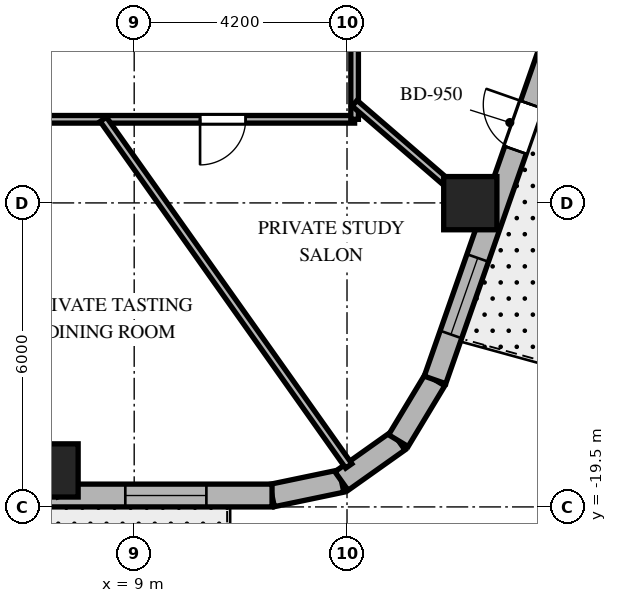
"""IFC4 building model, lengths in metres.
Left out: names, types, materials, properties, quantities, classifications, styles, units other than length and angle.
Written with IfcOpenShell. Run it as: python <this file> out.ifc"""

import sys

from ifc_helpers import new_model, si_unit, direction, frame, frame_2d, origin, origin_2d, place, context, subcontext, project, spatial, rectangle, extrude, element, fill, save


model = new_model("IFC4")
c1 = context("Model", 3, precision=1e-05, world=origin(), true_north=direction((0.0, 1.0)))
c2 = subcontext(c1, "Body", "Model", "MODEL_VIEW")
j1 = project(units=[si_unit("LENGTHUNIT", "METRE"), si_unit("PLANEANGLEUNIT", "RADIAN")], contexts=[c1])
p1 = place(None, origin())
s1 = spatial("IfcSite", under=j1, at=p1, CompositionType="ELEMENT")
p2 = place(p1, origin())
s2 = spatial("IfcBuilding", under=s1, at=p2, CompositionType="ELEMENT")
p3 = place(p2, frame((0.0, 0.0, 166.5)))
s3 = spatial("IfcBuildingStorey", under=s2, at=p3, CompositionType="ELEMENT", Elevation=166.5)
for number, where, z_axis, x_axis in (
    (1, (7.369, -18.78, 0.0), (0.0, 0.0, 1.0), (1.0, 0.0, 0.0)),
    (2, (15.633, -13.505, 0.0), (0.0, 0.0, 1.0), (1.0, 0.0, 0.0)),
):
    element("IfcColumn", number, at=place(p3, frame(where, z_axis=z_axis, x_axis=x_axis)), inside=s3, PredefinedType="COLUMN", context=c2, shape_type="SweptSolid", body=[
        extrude(rectangle(XDim=1.05, YDim=1.05, at=origin_2d()), origin(), (0.0, 0.0, 1.0), 3.7),
    ])
p4 = place(p3, frame((11.72, -19.275, 0.0), z_axis=(0.0, 0.0, 1.0), x_axis=(0.97893106758, 0.204191001093, 0.0)))
e3 = element("IfcWall", 3, at=p4, inside=s3, PredefinedType="SOLIDWALL", context=c2, shape_type="SweptSolid", body=[
    extrude(rectangle(XDim=1.4, YDim=0.45, at=frame_2d((0.7, 0.0))), origin(), (0.0, 0.0, 1.0), 3.38),
])
p5 = place(p3, frame((13.091, -18.989, 0.0), z_axis=(0.0, 0.0, 1.0), x_axis=(0.815574637848, 0.578651890258, 0.0)))
e4 = element("IfcWall", 4, at=p5, inside=s3, PredefinedType="SOLIDWALL", context=c2, shape_type="SweptSolid", body=[
    extrude(rectangle(XDim=1.377, YDim=0.45, at=frame_2d((0.688, 0.0))), origin(), (0.0, 0.0, 1.0), 3.38),
])
p6 = place(p3, frame((14.214, -18.192, 0.0), z_axis=(0.0, 0.0, 1.0), x_axis=(0.516340945502, 0.856383108193, 0.0)))
e5 = element("IfcWall", 5, at=p6, inside=s3, PredefinedType="SOLIDWALL", context=c2, shape_type="SweptSolid", body=[
    extrude(rectangle(XDim=1.4, YDim=0.45, at=frame_2d((0.7, 0.0))), origin(), (0.0, 0.0, 1.0), 3.38),
])
p7 = place(p3, frame((-10.108, -19.275, 0.0), z_axis=(0.0, 0.0, 1.0), x_axis=(1.0, 0.0, 0.0)))
e6 = element("IfcWall", 6, at=p7, inside=s3, PredefinedType="SOLIDWALL", context=c2, shape_type="SweptSolid", body=[
    extrude(rectangle(XDim=21.829, YDim=0.45, at=frame_2d((10.915, 0.0))), origin(), (0.0, 0.0, 1.0), 3.38),
])
p8 = place(p7, frame((5.503, 0.0, 0.0)))
e7 = element("IfcOpeningElement", 7, at=p8, cuts=e6, PredefinedType="OPENING", context=c2, shape_type="SweptSolid", body=[
    extrude(rectangle(XDim=1.0, YDim=2.15, at=frame_2d((0.5, 1.075))), frame((0.0, 0.235, 0.0), z_axis=(0.0, -1.0, 0.0), x_axis=(1.0, 0.0, 0.0)), (0.0, 0.0, 1.0), 0.47),
])
p9 = place(p7, frame((1.297, 0.0, 0.8)))
e8 = element("IfcOpeningElement", 8, at=p9, cuts=e6, PredefinedType="OPENING", context=c2, shape_type="SweptSolid", body=[
    extrude(rectangle(XDim=1.6, YDim=1.75, at=frame_2d((0.8, 0.875))), frame((0.0, 0.235, 0.0), z_axis=(0.0, -1.0, 0.0), x_axis=(1.0, 0.0, 0.0)), (0.0, 0.0, 1.0), 0.47),
])
p10 = place(p7, frame((7.402, 0.0, 0.8)))
e9 = element("IfcOpeningElement", 9, at=p10, cuts=e6, PredefinedType="OPENING", context=c2, shape_type="SweptSolid", body=[
    extrude(rectangle(XDim=1.6, YDim=1.75, at=frame_2d((0.8, 0.875))), frame((0.0, 0.235, 0.0), z_axis=(0.0, -1.0, 0.0), x_axis=(1.0, 0.0, 0.0)), (0.0, 0.0, 1.0), 0.47),
])
p11 = place(p7, frame((12.684, 0.0, 0.8)))
e10 = element("IfcOpeningElement", 10, at=p11, cuts=e6, PredefinedType="OPENING", context=c2, shape_type="SweptSolid", body=[
    extrude(rectangle(XDim=1.6, YDim=1.75, at=frame_2d((0.8, 0.875))), frame((0.0, 0.235, 0.0), z_axis=(0.0, -1.0, 0.0), x_axis=(1.0, 0.0, 0.0)), (0.0, 0.0, 1.0), 0.47),
])
p12 = place(p7, frame((18.933, 0.0, 0.8)))
e11 = element("IfcOpeningElement", 11, at=p12, cuts=e6, PredefinedType="OPENING", context=c2, shape_type="SweptSolid", body=[
    extrude(rectangle(XDim=1.6, YDim=1.75, at=frame_2d((0.8, 0.875))), frame((0.0, 0.235, 0.0), z_axis=(0.0, -1.0, 0.0), x_axis=(1.0, 0.0, 0.0)), (0.0, 0.0, 1.0), 0.47),
])
p13 = place(p3, frame((14.937, -16.993, 0.0), z_axis=(0.0, 0.0, 1.0), x_axis=(0.330431575061, 0.943829949834, 0.0)))
e12 = element("IfcWall", 12, at=p13, inside=s3, PredefinedType="SOLIDWALL", context=c2, shape_type="SweptSolid", body=[
    extrude(rectangle(XDim=17.689, YDim=0.45, at=frame_2d((8.844, 0.0))), origin(), (0.0, 0.0, 1.0), 3.38),
])
p14 = place(p13, frame((4.807, 0.0, 0.0)))
e13 = element("IfcOpeningElement", 13, at=p14, cuts=e12, PredefinedType="OPENING", context=c2, shape_type="SweptSolid", body=[
    extrude(rectangle(XDim=0.95, YDim=2.15, at=frame_2d((0.475, 1.075))), frame((0.0, 0.235, 0.0), z_axis=(0.0, -1.0, 0.0), x_axis=(1.0, 0.0, 0.0)), (0.0, 0.0, 1.0), 0.47),
])
p15 = place(p13, frame((0.95, 0.0, 0.8)))
e14 = element("IfcOpeningElement", 14, at=p15, cuts=e12, PredefinedType="OPENING", context=c2, shape_type="SweptSolid", body=[
    extrude(rectangle(XDim=1.6, YDim=1.75, at=frame_2d((0.8, 0.875))), frame((0.0, 0.235, 0.0), z_axis=(0.0, -1.0, 0.0), x_axis=(1.0, 0.0, 0.0)), (0.0, 0.0, 1.0), 0.47),
])
p16 = place(p13, frame((7.99, 0.0, 0.8)))
e15 = element("IfcOpeningElement", 15, at=p16, cuts=e12, PredefinedType="OPENING", context=c2, shape_type="SweptSolid", body=[
    extrude(rectangle(XDim=1.6, YDim=1.75, at=frame_2d((0.8, 0.875))), frame((0.0, 0.235, 0.0), z_axis=(0.0, -1.0, 0.0), x_axis=(1.0, 0.0, 0.0)), (0.0, 0.0, 1.0), 0.47),
])
p17 = place(p13, frame((15.084, 0.0, 0.8)))
e16 = element("IfcOpeningElement", 16, at=p17, cuts=e12, PredefinedType="OPENING", context=c2, shape_type="SweptSolid", body=[
    extrude(rectangle(XDim=1.6, YDim=1.75, at=frame_2d((0.8, 0.875))), frame((0.0, 0.235, 0.0), z_axis=(0.0, -1.0, 0.0), x_axis=(1.0, 0.0, 0.0)), (0.0, 0.0, 1.0), 0.47),
])
p18 = place(p3, frame((13.35, -11.85, 0.0), z_axis=(0.0, 0.0, 1.0), x_axis=(-1.0, 0.0, 0.0)))
e17 = element("IfcWall", 17, at=p18, inside=s3, PredefinedType="PARTITIONING", context=c2, shape_type="SweptSolid", body=[
    extrude(rectangle(XDim=26.7, YDim=0.15, at=frame_2d((13.35, 0.0))), origin(), (0.0, 0.0, 1.0), 2.82),
])
p19 = place(p18, frame((20.682, 0.0, 0.0)))
e18 = element("IfcOpeningElement", 18, at=p19, cuts=e17, PredefinedType="OPENING", context=c2, shape_type="SweptSolid", body=[
    extrude(rectangle(XDim=0.95, YDim=2.03, at=frame_2d((0.475, 1.015))), frame((0.0, 0.085, 0.0), z_axis=(0.0, -1.0, 0.0), x_axis=(1.0, 0.0, 0.0)), (0.0, 0.0, 1.0), 0.17),
])
p20 = place(p18, frame((14.708, 0.0, 0.0)))
e19 = element("IfcOpeningElement", 19, at=p20, cuts=e17, PredefinedType="OPENING", context=c2, shape_type="SweptSolid", body=[
    extrude(rectangle(XDim=0.95, YDim=2.03, at=frame_2d((0.475, 1.015))), frame((0.0, 0.085, 0.0), z_axis=(0.0, -1.0, 0.0), x_axis=(1.0, 0.0, 0.0)), (0.0, 0.0, 1.0), 0.17),
])
p21 = place(p18, frame((10.553, 0.0, 0.0)))
e20 = element("IfcOpeningElement", 20, at=p21, cuts=e17, PredefinedType="OPENING", context=c2, shape_type="SweptSolid", body=[
    extrude(rectangle(XDim=0.95, YDim=2.03, at=frame_2d((0.475, 1.015))), frame((0.0, 0.085, 0.0), z_axis=(0.0, -1.0, 0.0), x_axis=(1.0, 0.0, 0.0)), (0.0, 0.0, 1.0), 0.17),
])
p22 = place(p18, frame((6.353, 0.0, 0.0)))
e21 = element("IfcOpeningElement", 21, at=p22, cuts=e17, PredefinedType="OPENING", context=c2, shape_type="SweptSolid", body=[
    extrude(rectangle(XDim=0.9, YDim=2.03, at=frame_2d((0.45, 1.015))), frame((0.0, 0.085, 0.0), z_axis=(0.0, -1.0, 0.0), x_axis=(1.0, 0.0, 0.0)), (0.0, 0.0, 1.0), 0.17),
])
p23 = place(p18, frame((2.15, 0.0, 0.0)))
e22 = element("IfcOpeningElement", 22, at=p23, cuts=e17, PredefinedType="OPENING", context=c2, shape_type="SweptSolid", body=[
    extrude(rectangle(XDim=0.9, YDim=2.03, at=frame_2d((0.45, 1.015))), frame((0.0, 0.085, 0.0), z_axis=(0.0, -1.0, 0.0), x_axis=(1.0, 0.0, 0.0)), (0.0, 0.0, 1.0), 0.17),
])
p24 = place(p3, frame((13.35, 11.85, 0.0), z_axis=(0.0, 0.0, 1.0), x_axis=(0.0, -1.0, 0.0)))
e23 = element("IfcWall", 23, at=p24, inside=s3, PredefinedType="PARTITIONING", context=c2, shape_type="SweptSolid", body=[
    extrude(rectangle(XDim=23.7, YDim=0.15, at=frame_2d((11.85, 0.0))), origin(), (0.0, 0.0, 1.0), 2.82),
])
p25 = place(p24, frame((5.652, 0.0, 0.0)))
e24 = element("IfcOpeningElement", 24, at=p25, cuts=e23, PredefinedType="OPENING", context=c2, shape_type="SweptSolid", body=[
    extrude(rectangle(XDim=0.95, YDim=2.03, at=frame_2d((0.475, 1.015))), frame((0.0, 0.085, 0.0), z_axis=(0.0, -1.0, 0.0), x_axis=(1.0, 0.0, 0.0)), (0.0, 0.0, 1.0), 0.17),
])
p26 = place(p24, frame((1.721, 0.0, 0.0)))
e25 = element("IfcOpeningElement", 25, at=p26, cuts=e23, PredefinedType="OPENING", context=c2, shape_type="SweptSolid", body=[
    extrude(rectangle(XDim=0.9, YDim=2.03, at=frame_2d((0.45, 1.015))), frame((0.0, 0.085, 0.0), z_axis=(0.0, -1.0, 0.0), x_axis=(1.0, 0.0, 0.0)), (0.0, 0.0, 1.0), 0.17),
])
p27 = place(p24, frame((18.389, 0.0, 0.0)))
e26 = element("IfcOpeningElement", 26, at=p27, cuts=e23, PredefinedType="OPENING", context=c2, shape_type="SweptSolid", body=[
    extrude(rectangle(XDim=0.95, YDim=2.03, at=frame_2d((0.475, 1.015))), frame((0.0, 0.085, 0.0), z_axis=(0.0, -1.0, 0.0), x_axis=(1.0, 0.0, 0.0)), (0.0, 0.0, 1.0), 0.17),
])
p28 = place(p24, frame((10.751, 0.0, 0.0)))
e27 = element("IfcOpeningElement", 27, at=p28, cuts=e23, PredefinedType="OPENING", context=c2, shape_type="SweptSolid", body=[
    extrude(rectangle(XDim=0.95, YDim=2.03, at=frame_2d((0.475, 1.015))), frame((0.0, 0.085, 0.0), z_axis=(0.0, -1.0, 0.0), x_axis=(1.0, 0.0, 0.0)), (0.0, 0.0, 1.0), 0.17),
])
p29 = place(p3, frame((4.65, -11.85, 0.0), z_axis=(0.0, 0.0, 1.0), x_axis=(0.365265947993, -0.930903210456, 0.0)))
e28 = element("IfcWall", 28, at=p29, inside=s3, PredefinedType="PARTITIONING", context=c2, shape_type="SweptSolid", body=[
    extrude(rectangle(XDim=7.976, YDim=0.15, at=frame_2d((3.988, 0.0))), origin(), (0.0, 0.0, 1.0), 2.62),
])
p30 = place(p3, frame((8.39, -11.85, 0.0), z_axis=(0.0, 0.0, 1.0), x_axis=(0.577877530264, -0.816123495566, 0.0)))
e29 = element("IfcWall", 29, at=p30, inside=s3, PredefinedType="PARTITIONING", context=c2, shape_type="SweptSolid", body=[
    extrude(rectangle(XDim=8.382, YDim=0.15, at=frame_2d((4.191, 0.0))), origin(), (0.0, 0.0, 1.0), 2.62),
])
p31 = place(p3, frame((13.35, -11.533, 0.0), z_axis=(0.0, 0.0, 1.0), x_axis=(0.756711647314, -0.65374879183, 0.0)))
e30 = element("IfcWall", 30, at=p31, inside=s3, PredefinedType="PARTITIONING", context=c2, shape_type="SweptSolid", body=[
    extrude(rectangle(XDim=3.55, YDim=0.15, at=frame_2d((1.775, 0.0))), origin(), (0.0, 0.0, 1.0), 2.62),
])
p32 = place(p12, origin())
e31 = element("IfcWindow", 31, at=p32, inside=s3, PartitioningType="SINGLE_PANEL", PredefinedType="WINDOW", context=c2, shape_type="SweptSolid", body=[
    extrude(rectangle(XDim=1.6, YDim=1.75, at=frame_2d((0.8, 0.875))), frame((0.0, 0.03, 0.0), z_axis=(0.0, -1.0, 0.0), x_axis=(1.0, 0.0, 0.0)), (0.0, 0.0, 1.0), 0.06),
])
fill(e11, e31)
p33 = place(p14, origin())
e32 = element("IfcDoor", 32, at=p33, inside=s3, OperationType="SINGLE_SWING_RIGHT", PredefinedType="DOOR", context=c2, shape_type="SweptSolid", body=[
    extrude(rectangle(XDim=0.95, YDim=2.15, at=frame_2d((0.475, 1.075))), frame((0.0, 0.025, 0.0), z_axis=(0.0, -1.0, 0.0), x_axis=(1.0, 0.0, 0.0)), (0.0, 0.0, 1.0), 0.05),
])
fill(e13, e32)
p34 = place(p15, origin())
e33 = element("IfcWindow", 33, at=p34, inside=s3, PartitioningType="SINGLE_PANEL", PredefinedType="WINDOW", context=c2, shape_type="SweptSolid", body=[
    extrude(rectangle(XDim=1.6, YDim=1.75, at=frame_2d((0.8, 0.875))), frame((0.0, 0.03, 0.0), z_axis=(0.0, -1.0, 0.0), x_axis=(1.0, 0.0, 0.0)), (0.0, 0.0, 1.0), 0.06),
])
fill(e14, e33)
p35 = place(p23, origin())
e34 = element("IfcDoor", 34, at=p35, inside=s3, OperationType="SINGLE_SWING_RIGHT", PredefinedType="DOOR", context=c2, shape_type="SweptSolid", body=[
    extrude(rectangle(XDim=0.9, YDim=2.03, at=frame_2d((0.45, 1.015))), frame((0.0, 0.025, 0.0), z_axis=(0.0, -1.0, 0.0), x_axis=(1.0, 0.0, 0.0)), (0.0, 0.0, 1.0), 0.05),
])
fill(e22, e34)
save(model, sys.argv[1])
